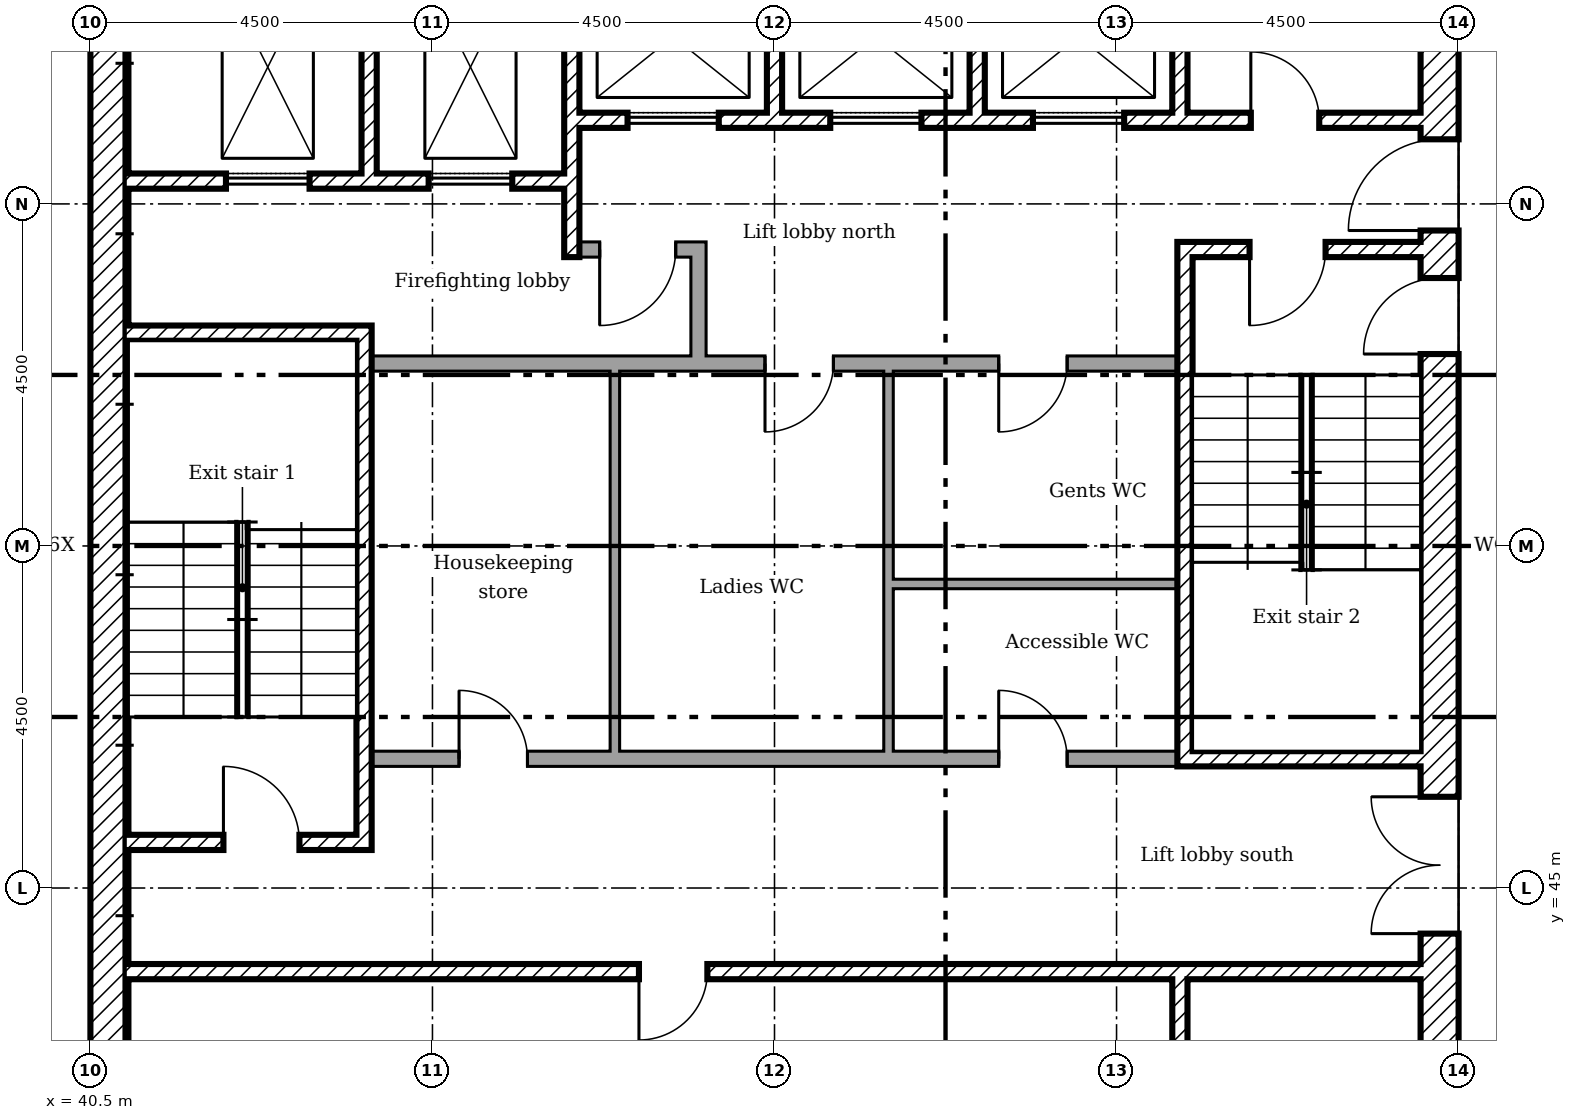
"""IFC4 building model, lengths in metres.
Left out: names, types, materials, properties, quantities, classifications, styles, units other than length and angle.
Written with IfcOpenShell. Run it as: python <this file> out.ifc"""

import sys

from ifc_helpers import new_model, si_unit, direction, frame, frame_2d, origin, place, context, subcontext, project, spatial, rectangle, extrude, element, fill, save


model = new_model("IFC4")
c1 = context("Model", 3, precision=1e-05, world=origin(), true_north=direction((0.0, 1.0)))
c2 = subcontext(c1, "Body", "Model", "MODEL_VIEW")
j1 = project(units=[si_unit("LENGTHUNIT", "METRE"), si_unit("PLANEANGLEUNIT", "RADIAN")], contexts=[c1])
p1 = place(None, origin())
s1 = spatial("IfcSite", under=j1, at=p1, CompositionType="ELEMENT")
p2 = place(p1, origin())
s2 = spatial("IfcBuilding", under=s1, at=p2, CompositionType="ELEMENT")
p3 = place(p2, frame((0.0, 0.0, 228.0)))
s3 = spatial("IfcBuildingStorey", under=s2, at=p3, CompositionType="ELEMENT", Elevation=228.0)
p4 = place(p3, frame((58.25, 40.5, 0.0), z_axis=(0.0, 0.0, 1.0), x_axis=(0.0, 1.0, 0.0)))
e1 = element("IfcWall", 1, at=p4, inside=s3, PredefinedType="SHEAR", context=c2, shape_type="SweptSolid", body=[
    extrude(rectangle(XDim=18.0, YDim=0.5, at=frame_2d((9.0, 0.0))), origin(), (0.0, 0.0, 1.0), 3.35),
])
p5 = place(p4, frame((13.15, 0.0, 0.0)))
e2 = element("IfcOpeningElement", 2, at=p5, cuts=e1, PredefinedType="OPENING", context=c2, shape_type="SweptSolid", body=[
    extrude(rectangle(XDim=1.2, YDim=2.1, at=frame_2d((0.6, 1.05))), frame((0.0, 0.26, 0.0), z_axis=(0.0, -1.0, 0.0), x_axis=(1.0, 0.0, 0.0)), (0.0, 0.0, 1.0), 0.52),
])
p6 = place(p4, frame((3.9, 0.0, 0.0)))
e3 = element("IfcOpeningElement", 3, at=p6, cuts=e1, PredefinedType="OPENING", context=c2, shape_type="SweptSolid", body=[
    extrude(rectangle(XDim=1.8, YDim=2.1, at=frame_2d((0.9, 1.05))), frame((0.0, 0.26, 0.0), z_axis=(0.0, -1.0, 0.0), x_axis=(1.0, 0.0, 0.0)), (0.0, 0.0, 1.0), 0.52),
])
p7 = place(p4, frame((11.525, 0.0, 0.0)))
e4 = element("IfcOpeningElement", 4, at=p7, cuts=e1, PredefinedType="OPENING", context=c2, shape_type="SweptSolid", body=[
    extrude(rectangle(XDim=1.0, YDim=2.1, at=frame_2d((0.5, 1.05))), frame((0.0, 0.26, 0.0), z_axis=(0.0, -1.0, 0.0), x_axis=(1.0, 0.0, 0.0)), (0.0, 0.0, 1.0), 0.52),
])
p8 = place(p3, frame((40.75, 41.0, 0.0), z_axis=(0.0, 0.0, 1.0), x_axis=(0.0, 1.0, 0.0)))
e5 = element("IfcWall", 5, at=p8, inside=s3, PredefinedType="SHEAR", context=c2, shape_type="SweptSolid", body=[
    extrude(rectangle(XDim=17.0, YDim=0.5, at=frame_2d((8.5, 0.0))), origin(), (0.0, 0.0, 1.0), 3.35),
])
p9 = place(p3, frame((44.167, 58.0, 0.0), z_axis=(0.0, 0.0, 1.0), x_axis=(0.0, -1.0, 0.0)))
e6 = element("IfcWall", 6, at=p9, inside=s3, PredefinedType="SHEAR", context=c2, shape_type="SweptSolid", body=[
    extrude(rectangle(XDim=3.6, YDim=0.2, at=frame_2d((1.8, 0.0))), origin(), (0.0, 0.0, 1.0), 3.35),
])
p10 = place(p3, frame((46.833, 58.0, 0.0), z_axis=(0.0, 0.0, 1.0), x_axis=(0.0, -1.0, 0.0)))
e7 = element("IfcWall", 7, at=p10, inside=s3, PredefinedType="SHEAR", context=c2, shape_type="SweptSolid", body=[
    extrude(rectangle(XDim=4.7, YDim=0.2, at=frame_2d((2.35, 0.0))), origin(), (0.0, 0.0, 1.0), 3.35),
])
for number, where, z_axis, x_axis in (
    (8, (49.5, 58.0, 0.0), (0.0, 0.0, 1.0), (0.0, -1.0, 0.0)),
    (9, (52.167, 58.0, 0.0), (0.0, 0.0, 1.0), (0.0, -1.0, 0.0)),
    (10, (54.833, 58.0, 0.0), (0.0, 0.0, 1.0), (0.0, -1.0, 0.0)),
    (11, (54.833, 41.0, 0.0), (0.0, 0.0, 1.0), (0.0, 1.0, 0.0)),
):
    element("IfcWall", number, at=place(p3, frame(where, z_axis=z_axis, x_axis=x_axis)), inside=s3, PredefinedType="SHEAR", context=c2, shape_type="SweptSolid", body=[
        extrude(rectangle(XDim=2.8, YDim=0.2, at=frame_2d((1.4, 0.0))), origin(), (0.0, 0.0, 1.0), 3.35),
    ])
p11 = place(p3, frame((48.5, 51.9, 0.0), z_axis=(0.0, 0.0, 1.0), x_axis=(0.0, 1.0, 0.0)))
e12 = element("IfcWall", 12, at=p11, inside=s3, PredefinedType="PARTITIONING", context=c2, shape_type="SweptSolid", body=[
    extrude(rectangle(XDim=1.6, YDim=0.2, at=frame_2d((0.8, 0.0))), origin(), (0.0, 0.0, 1.0), 3.35),
])
p12 = place(p3, frame((46.933, 53.4, 0.0)))
e13 = element("IfcWall", 13, at=p12, inside=s3, PredefinedType="PARTITIONING", context=c2, shape_type="SweptSolid", body=[
    extrude(rectangle(XDim=1.467, YDim=0.2, at=frame_2d((0.733, 0.0))), origin(), (0.0, 0.0, 1.0), 3.35),
])
p13 = place(p12, frame((0.267, 0.0, 0.0)))
e14 = element("IfcOpeningElement", 14, at=p13, cuts=e13, PredefinedType="OPENING", context=c2, shape_type="SweptSolid", body=[
    extrude(rectangle(XDim=1.0, YDim=2.1, at=frame_2d((0.5, 1.05))), frame((0.0, 0.11, 0.0), z_axis=(0.0, -1.0, 0.0), x_axis=(1.0, 0.0, 0.0)), (0.0, 0.0, 1.0), 0.22),
])
p14 = place(p3, frame((46.933, 55.1, 0.0)))
e15 = element("IfcWall", 15, at=p14, inside=s3, PredefinedType="SHEAR", context=c2, shape_type="SweptSolid", body=[
    extrude(rectangle(XDim=11.067, YDim=0.2, at=frame_2d((5.533, 0.0))), origin(), (0.0, 0.0, 1.0), 3.35),
])
p15 = place(p14, frame((8.833, 0.0, 0.0)))
e16 = element("IfcOpeningElement", 16, at=p15, cuts=e15, PredefinedType="OPENING", context=c2, shape_type="SweptSolid", body=[
    extrude(rectangle(XDim=0.9, YDim=2.1, at=frame_2d((0.45, 1.05))), frame((0.0, 0.11, 0.0), z_axis=(0.0, -1.0, 0.0), x_axis=(1.0, 0.0, 0.0)), (0.0, 0.0, 1.0), 0.22),
])
p16 = place(p14, frame((0.633, 0.0, 0.0)))
e17 = element("IfcOpeningElement", 17, at=p16, cuts=e15, PredefinedType="OPENING", context=c2, shape_type="SweptSolid", body=[
    extrude(rectangle(XDim=1.2, YDim=2.1, at=frame_2d((0.6, 1.05))), frame((0.0, 0.11, 0.0), z_axis=(0.0, -1.0, 0.0), x_axis=(1.0, 0.0, 0.0)), (0.0, 0.0, 1.0), 0.22),
])
p17 = place(p14, frame((3.3, 0.0, 0.0)))
e18 = element("IfcOpeningElement", 18, at=p17, cuts=e15, PredefinedType="OPENING", context=c2, shape_type="SweptSolid", body=[
    extrude(rectangle(XDim=1.2, YDim=2.1, at=frame_2d((0.6, 1.05))), frame((0.0, 0.11, 0.0), z_axis=(0.0, -1.0, 0.0), x_axis=(1.0, 0.0, 0.0)), (0.0, 0.0, 1.0), 0.22),
])
p18 = place(p14, frame((5.967, 0.0, 0.0)))
e19 = element("IfcOpeningElement", 19, at=p18, cuts=e15, PredefinedType="OPENING", context=c2, shape_type="SweptSolid", body=[
    extrude(rectangle(XDim=1.2, YDim=2.1, at=frame_2d((0.6, 1.05))), frame((0.0, 0.11, 0.0), z_axis=(0.0, -1.0, 0.0), x_axis=(1.0, 0.0, 0.0)), (0.0, 0.0, 1.0), 0.22),
])
p19 = place(p3, frame((41.0, 54.3, 0.0)))
e20 = element("IfcWall", 20, at=p19, inside=s3, PredefinedType="SHEAR", context=c2, shape_type="SweptSolid", body=[
    extrude(rectangle(XDim=5.733, YDim=0.2, at=frame_2d((2.867, 0.0))), origin(), (0.0, 0.0, 1.0), 3.35),
])
p20 = place(p19, frame((1.283, 0.0, 0.0)))
e21 = element("IfcOpeningElement", 21, at=p20, cuts=e20, PredefinedType="OPENING", context=c2, shape_type="SweptSolid", body=[
    extrude(rectangle(XDim=1.1, YDim=2.1, at=frame_2d((0.55, 1.05))), frame((0.0, 0.11, 0.0), z_axis=(0.0, -1.0, 0.0), x_axis=(1.0, 0.0, 0.0)), (0.0, 0.0, 1.0), 0.22),
])
p21 = place(p19, frame((3.95, 0.0, 0.0)))
e22 = element("IfcOpeningElement", 22, at=p21, cuts=e20, PredefinedType="OPENING", context=c2, shape_type="SweptSolid", body=[
    extrude(rectangle(XDim=1.1, YDim=2.1, at=frame_2d((0.55, 1.05))), frame((0.0, 0.11, 0.0), z_axis=(0.0, -1.0, 0.0), x_axis=(1.0, 0.0, 0.0)), (0.0, 0.0, 1.0), 0.22),
])
p22 = place(p3, frame((41.0, 43.9, 0.0)))
e23 = element("IfcWall", 23, at=p22, inside=s3, PredefinedType="SHEAR", context=c2, shape_type="SweptSolid", body=[
    extrude(rectangle(XDim=17.0, YDim=0.2, at=frame_2d((8.5, 0.0))), origin(), (0.0, 0.0, 1.0), 3.35),
])
p23 = place(p22, frame((6.717, 0.0, 0.0)))
e24 = element("IfcOpeningElement", 24, at=p23, cuts=e23, PredefinedType="OPENING", context=c2, shape_type="SweptSolid", body=[
    extrude(rectangle(XDim=0.9, YDim=2.1, at=frame_2d((0.45, 1.05))), frame((0.0, 0.11, 0.0), z_axis=(0.0, -1.0, 0.0), x_axis=(1.0, 0.0, 0.0)), (0.0, 0.0, 1.0), 0.22),
])
p24 = place(p3, frame((44.1, 45.5, 0.0), z_axis=(0.0, 0.0, 1.0), x_axis=(0.0, 1.0, 0.0)))
e25 = element("IfcWall", 25, at=p24, inside=s3, PredefinedType="SHEAR", context=c2, shape_type="SweptSolid", body=[
    extrude(rectangle(XDim=6.9, YDim=0.2, at=frame_2d((3.45, 0.0))), origin(), (0.0, 0.0, 1.0), 3.35),
])
p25 = place(p3, frame((41.0, 52.3, 0.0)))
e26 = element("IfcWall", 26, at=p25, inside=s3, PredefinedType="SHEAR", context=c2, shape_type="SweptSolid", body=[
    extrude(rectangle(XDim=3.0, YDim=0.2, at=frame_2d((1.5, 0.0))), origin(), (0.0, 0.0, 1.0), 3.35),
])
p26 = place(p3, frame((41.0, 45.6, 0.0)))
e27 = element("IfcWall", 27, at=p26, inside=s3, PredefinedType="SHEAR", context=c2, shape_type="SweptSolid", body=[
    extrude(rectangle(XDim=3.0, YDim=0.2, at=frame_2d((1.5, 0.0))), origin(), (0.0, 0.0, 1.0), 3.35),
])
p27 = place(p26, frame((1.25, 0.0, 0.0)))
e28 = element("IfcOpeningElement", 28, at=p27, cuts=e27, PredefinedType="OPENING", context=c2, shape_type="SweptSolid", body=[
    extrude(rectangle(XDim=1.0, YDim=2.1, at=frame_2d((0.5, 1.05))), frame((0.0, 0.11, 0.0), z_axis=(0.0, -1.0, 0.0), x_axis=(1.0, 0.0, 0.0)), (0.0, 0.0, 1.0), 0.22),
])
p28 = place(p3, frame((54.8, 53.4, 0.0)))
e29 = element("IfcWall", 29, at=p28, inside=s3, PredefinedType="SHEAR", context=c2, shape_type="SweptSolid", body=[
    extrude(rectangle(XDim=3.2, YDim=0.2, at=frame_2d((1.6, 0.0))), origin(), (0.0, 0.0, 1.0), 3.35),
])
p29 = place(p28, frame((0.95, 0.0, 0.0)))
e30 = element("IfcOpeningElement", 30, at=p29, cuts=e29, PredefinedType="OPENING", context=c2, shape_type="SweptSolid", body=[
    extrude(rectangle(XDim=1.0, YDim=2.1, at=frame_2d((0.5, 1.05))), frame((0.0, 0.11, 0.0), z_axis=(0.0, -1.0, 0.0), x_axis=(1.0, 0.0, 0.0)), (0.0, 0.0, 1.0), 0.22),
])
p30 = place(p3, frame((54.8, 46.7, 0.0)))
e31 = element("IfcWall", 31, at=p30, inside=s3, PredefinedType="SHEAR", context=c2, shape_type="SweptSolid", body=[
    extrude(rectangle(XDim=3.2, YDim=0.2, at=frame_2d((1.6, 0.0))), origin(), (0.0, 0.0, 1.0), 3.35),
])
p31 = place(p3, frame((54.9, 46.8, 0.0), z_axis=(0.0, 0.0, 1.0), x_axis=(0.0, 1.0, 0.0)))
e32 = element("IfcWall", 32, at=p31, inside=s3, PredefinedType="SHEAR", context=c2, shape_type="SweptSolid", body=[
    extrude(rectangle(XDim=6.5, YDim=0.2, at=frame_2d((3.25, 0.0))), origin(), (0.0, 0.0, 1.0), 3.35),
])
p32 = place(p3, frame((44.2, 51.9, 0.0)))
e33 = element("IfcWall", 33, at=p32, inside=s3, PredefinedType="PARTITIONING", context=c2, shape_type="SweptSolid", body=[
    extrude(rectangle(XDim=10.6, YDim=0.2, at=frame_2d((5.3, 0.0))), origin(), (0.0, 0.0, 1.0), 3.35),
])
p33 = place(p32, frame((5.175, 0.0, 0.0)))
e34 = element("IfcOpeningElement", 34, at=p33, cuts=e33, PredefinedType="OPENING", context=c2, shape_type="SweptSolid", body=[
    extrude(rectangle(XDim=0.9, YDim=2.1, at=frame_2d((0.45, 1.05))), frame((0.0, 0.11, 0.0), z_axis=(0.0, -1.0, 0.0), x_axis=(1.0, 0.0, 0.0)), (0.0, 0.0, 1.0), 0.22),
])
p34 = place(p32, frame((8.25, 0.0, 0.0)))
e35 = element("IfcOpeningElement", 35, at=p34, cuts=e33, PredefinedType="OPENING", context=c2, shape_type="SweptSolid", body=[
    extrude(rectangle(XDim=0.9, YDim=2.1, at=frame_2d((0.45, 1.05))), frame((0.0, 0.11, 0.0), z_axis=(0.0, -1.0, 0.0), x_axis=(1.0, 0.0, 0.0)), (0.0, 0.0, 1.0), 0.22),
])
p35 = place(p3, frame((44.2, 46.7, 0.0)))
e36 = element("IfcWall", 36, at=p35, inside=s3, PredefinedType="PARTITIONING", context=c2, shape_type="SweptSolid", body=[
    extrude(rectangle(XDim=10.6, YDim=0.2, at=frame_2d((5.3, 0.0))), origin(), (0.0, 0.0, 1.0), 3.35),
])
p36 = place(p35, frame((1.15, 0.0, 0.0)))
e37 = element("IfcOpeningElement", 37, at=p36, cuts=e36, PredefinedType="OPENING", context=c2, shape_type="SweptSolid", body=[
    extrude(rectangle(XDim=0.9, YDim=2.1, at=frame_2d((0.45, 1.05))), frame((0.0, 0.11, 0.0), z_axis=(0.0, -1.0, 0.0), x_axis=(1.0, 0.0, 0.0)), (0.0, 0.0, 1.0), 0.22),
])
p37 = place(p35, frame((8.25, 0.0, 0.0)))
e38 = element("IfcOpeningElement", 38, at=p37, cuts=e36, PredefinedType="OPENING", context=c2, shape_type="SweptSolid", body=[
    extrude(rectangle(XDim=0.9, YDim=2.1, at=frame_2d((0.45, 1.05))), frame((0.0, 0.11, 0.0), z_axis=(0.0, -1.0, 0.0), x_axis=(1.0, 0.0, 0.0)), (0.0, 0.0, 1.0), 0.22),
])
p38 = place(p3, frame((47.4, 46.8, 0.0), z_axis=(0.0, 0.0, 1.0), x_axis=(0.0, 1.0, 0.0)))
e39 = element("IfcWall", 39, at=p38, inside=s3, PredefinedType="PARTITIONING", context=c2, shape_type="SweptSolid", body=[
    extrude(rectangle(XDim=5.0, YDim=0.125, at=frame_2d((2.5, 0.0))), origin(), (0.0, 0.0, 1.0), 3.35),
])
p39 = place(p3, frame((51.0, 46.8, 0.0), z_axis=(0.0, 0.0, 1.0), x_axis=(0.0, 1.0, 0.0)))
e40 = element("IfcWall", 40, at=p39, inside=s3, PredefinedType="PARTITIONING", context=c2, shape_type="SweptSolid", body=[
    extrude(rectangle(XDim=2.262, YDim=0.125, at=frame_2d((1.131, 0.0))), origin(), (0.0, 0.0, 1.0), 3.35),
])
p40 = place(p3, frame((54.8, 49.0, 0.0), z_axis=(0.0, 0.0, 1.0), x_axis=(-1.0, 0.0, 0.0)))
e41 = element("IfcWall", 41, at=p40, inside=s3, PredefinedType="PARTITIONING", context=c2, shape_type="SweptSolid", body=[
    extrude(rectangle(XDim=3.738, YDim=0.125, at=frame_2d((1.869, 0.0))), origin(), (0.0, 0.0, 1.0), 3.35),
])
p41 = place(p3, frame((51.0, 49.0, 0.0), z_axis=(0.0, 0.0, 1.0), x_axis=(0.0, 1.0, 0.0)))
e42 = element("IfcWall", 42, at=p41, inside=s3, PredefinedType="PARTITIONING", context=c2, shape_type="SweptSolid", body=[
    extrude(rectangle(XDim=2.8, YDim=0.125, at=frame_2d((1.4, 0.0))), origin(), (0.0, 0.0, 1.0), 3.35),
])
p42 = place(p5, origin())
e43 = element("IfcDoor", 43, at=p42, inside=s3, OperationType="SINGLE_SWING_RIGHT", PredefinedType="DOOR", context=c2, shape_type="SweptSolid", body=[
    extrude(rectangle(XDim=1.2, YDim=2.1, at=frame_2d((0.6, 1.05))), frame((0.0, 0.025, 0.0), z_axis=(0.0, -1.0, 0.0), x_axis=(1.0, 0.0, 0.0)), (0.0, 0.0, 1.0), 0.05),
])
fill(e2, e43)
p43 = place(p6, origin())
e44 = element("IfcDoor", 44, at=p43, inside=s3, OperationType="DOUBLE_DOOR_SINGLE_SWING", PredefinedType="DOOR", context=c2, shape_type="SweptSolid", body=[
    extrude(rectangle(XDim=1.8, YDim=2.1, at=frame_2d((0.9, 1.05))), frame((0.0, 0.025, 0.0), z_axis=(0.0, -1.0, 0.0), x_axis=(1.0, 0.0, 0.0)), (0.0, 0.0, 1.0), 0.05),
])
fill(e3, e44)
p44 = place(p27, origin())
e45 = element("IfcDoor", 45, at=p44, inside=s3, OperationType="SINGLE_SWING_RIGHT", PredefinedType="DOOR", context=c2, shape_type="SweptSolid", body=[
    extrude(rectangle(XDim=1.0, YDim=2.1, at=frame_2d((0.5, 1.05))), frame((0.0, 0.025, 0.0), z_axis=(0.0, -1.0, 0.0), x_axis=(1.0, 0.0, 0.0)), (0.0, 0.0, 1.0), 0.05),
])
fill(e28, e45)
p45 = place(p29, frame((1.0, 0.0, 0.0), x_axis=(-1.0, 0.0, 0.0)))
e46 = element("IfcDoor", 46, at=p45, inside=s3, OperationType="SINGLE_SWING_LEFT", PredefinedType="DOOR", context=c2, shape_type="SweptSolid", body=[
    extrude(rectangle(XDim=1.0, YDim=2.1, at=frame_2d((0.5, 1.05))), frame((0.0, 0.025, 0.0), z_axis=(0.0, -1.0, 0.0), x_axis=(1.0, 0.0, 0.0)), (0.0, 0.0, 1.0), 0.05),
])
fill(e30, e46)
p46 = place(p7, origin())
e47 = element("IfcDoor", 47, at=p46, inside=s3, OperationType="SINGLE_SWING_RIGHT", PredefinedType="DOOR", context=c2, shape_type="SweptSolid", body=[
    extrude(rectangle(XDim=1.0, YDim=2.1, at=frame_2d((0.5, 1.05))), frame((0.0, 0.025, 0.0), z_axis=(0.0, -1.0, 0.0), x_axis=(1.0, 0.0, 0.0)), (0.0, 0.0, 1.0), 0.05),
])
fill(e4, e47)
p47 = place(p13, frame((1.0, 0.0, 0.0), x_axis=(-1.0, 0.0, 0.0)))
e48 = element("IfcDoor", 48, at=p47, inside=s3, OperationType="SINGLE_SWING_LEFT", PredefinedType="DOOR", context=c2, shape_type="SweptSolid", body=[
    extrude(rectangle(XDim=1.0, YDim=2.1, at=frame_2d((0.5, 1.05))), frame((0.0, 0.025, 0.0), z_axis=(0.0, -1.0, 0.0), x_axis=(1.0, 0.0, 0.0)), (0.0, 0.0, 1.0), 0.05),
])
fill(e14, e48)
p48 = place(p15, origin())
e49 = element("IfcDoor", 49, at=p48, inside=s3, OperationType="SINGLE_SWING_RIGHT", PredefinedType="DOOR", context=c2, shape_type="SweptSolid", body=[
    extrude(rectangle(XDim=0.9, YDim=2.1, at=frame_2d((0.45, 1.05))), frame((0.0, 0.025, 0.0), z_axis=(0.0, -1.0, 0.0), x_axis=(1.0, 0.0, 0.0)), (0.0, 0.0, 1.0), 0.05),
])
fill(e16, e49)
p49 = place(p23, frame((0.9, 0.0, 0.0), x_axis=(-1.0, 0.0, 0.0)))
e50 = element("IfcDoor", 50, at=p49, inside=s3, OperationType="SINGLE_SWING_LEFT", PredefinedType="DOOR", context=c2, shape_type="SweptSolid", body=[
    extrude(rectangle(XDim=0.9, YDim=2.1, at=frame_2d((0.45, 1.05))), frame((0.0, 0.025, 0.0), z_axis=(0.0, -1.0, 0.0), x_axis=(1.0, 0.0, 0.0)), (0.0, 0.0, 1.0), 0.05),
])
fill(e24, e50)
p50 = place(p36, origin())
e51 = element("IfcDoor", 51, at=p50, inside=s3, OperationType="SINGLE_SWING_RIGHT", PredefinedType="DOOR", context=c2, shape_type="SweptSolid", body=[
    extrude(rectangle(XDim=0.9, YDim=2.1, at=frame_2d((0.45, 1.05))), frame((0.0, 0.025, 0.0), z_axis=(0.0, -1.0, 0.0), x_axis=(1.0, 0.0, 0.0)), (0.0, 0.0, 1.0), 0.05),
])
fill(e37, e51)
p51 = place(p33, frame((0.9, 0.0, 0.0), x_axis=(-1.0, 0.0, 0.0)))
e52 = element("IfcDoor", 52, at=p51, inside=s3, OperationType="SINGLE_SWING_LEFT", PredefinedType="DOOR", context=c2, shape_type="SweptSolid", body=[
    extrude(rectangle(XDim=0.9, YDim=2.1, at=frame_2d((0.45, 1.05))), frame((0.0, 0.025, 0.0), z_axis=(0.0, -1.0, 0.0), x_axis=(1.0, 0.0, 0.0)), (0.0, 0.0, 1.0), 0.05),
])
fill(e34, e52)
p52 = place(p37, origin())
e53 = element("IfcDoor", 53, at=p52, inside=s3, OperationType="SINGLE_SWING_RIGHT", PredefinedType="DOOR", context=c2, shape_type="SweptSolid", body=[
    extrude(rectangle(XDim=0.9, YDim=2.1, at=frame_2d((0.45, 1.05))), frame((0.0, 0.025, 0.0), z_axis=(0.0, -1.0, 0.0), x_axis=(1.0, 0.0, 0.0)), (0.0, 0.0, 1.0), 0.05),
])
fill(e38, e53)
p53 = place(p34, frame((0.9, 0.0, 0.0), x_axis=(-1.0, 0.0, 0.0)))
e54 = element("IfcDoor", 54, at=p53, inside=s3, OperationType="SINGLE_SWING_LEFT", PredefinedType="DOOR", context=c2, shape_type="SweptSolid", body=[
    extrude(rectangle(XDim=0.9, YDim=2.1, at=frame_2d((0.45, 1.05))), frame((0.0, 0.025, 0.0), z_axis=(0.0, -1.0, 0.0), x_axis=(1.0, 0.0, 0.0)), (0.0, 0.0, 1.0), 0.05),
])
fill(e35, e54)
p54 = place(p20, origin())
e55 = element("IfcDoor", 55, at=p54, inside=s3, OperationType="SLIDING_TO_LEFT", PredefinedType="DOOR", context=c2, shape_type="SweptSolid", body=[
    extrude(rectangle(XDim=1.1, YDim=2.1, at=frame_2d((0.55, 1.05))), frame((0.0, 0.025, 0.0), z_axis=(0.0, -1.0, 0.0), x_axis=(1.0, 0.0, 0.0)), (0.0, 0.0, 1.0), 0.05),
])
fill(e21, e55)
p55 = place(p21, origin())
e56 = element("IfcDoor", 56, at=p55, inside=s3, OperationType="SLIDING_TO_LEFT", PredefinedType="DOOR", context=c2, shape_type="SweptSolid", body=[
    extrude(rectangle(XDim=1.1, YDim=2.1, at=frame_2d((0.55, 1.05))), frame((0.0, 0.025, 0.0), z_axis=(0.0, -1.0, 0.0), x_axis=(1.0, 0.0, 0.0)), (0.0, 0.0, 1.0), 0.05),
])
fill(e22, e56)
p56 = place(p16, origin())
e57 = element("IfcDoor", 57, at=p56, inside=s3, OperationType="SLIDING_TO_LEFT", PredefinedType="DOOR", context=c2, shape_type="SweptSolid", body=[
    extrude(rectangle(XDim=1.2, YDim=2.1, at=frame_2d((0.6, 1.05))), frame((0.0, 0.025, 0.0), z_axis=(0.0, -1.0, 0.0), x_axis=(1.0, 0.0, 0.0)), (0.0, 0.0, 1.0), 0.05),
])
fill(e17, e57)
p57 = place(p17, origin())
e58 = element("IfcDoor", 58, at=p57, inside=s3, OperationType="SLIDING_TO_LEFT", PredefinedType="DOOR", context=c2, shape_type="SweptSolid", body=[
    extrude(rectangle(XDim=1.2, YDim=2.1, at=frame_2d((0.6, 1.05))), frame((0.0, 0.025, 0.0), z_axis=(0.0, -1.0, 0.0), x_axis=(1.0, 0.0, 0.0)), (0.0, 0.0, 1.0), 0.05),
])
fill(e18, e58)
p58 = place(p18, origin())
e59 = element("IfcDoor", 59, at=p58, inside=s3, OperationType="SLIDING_TO_LEFT", PredefinedType="DOOR", context=c2, shape_type="SweptSolid", body=[
    extrude(rectangle(XDim=1.2, YDim=2.1, at=frame_2d((0.6, 1.05))), frame((0.0, 0.025, 0.0), z_axis=(0.0, -1.0, 0.0), x_axis=(1.0, 0.0, 0.0)), (0.0, 0.0, 1.0), 0.05),
])
fill(e19, e59)
save(model, sys.argv[1])
